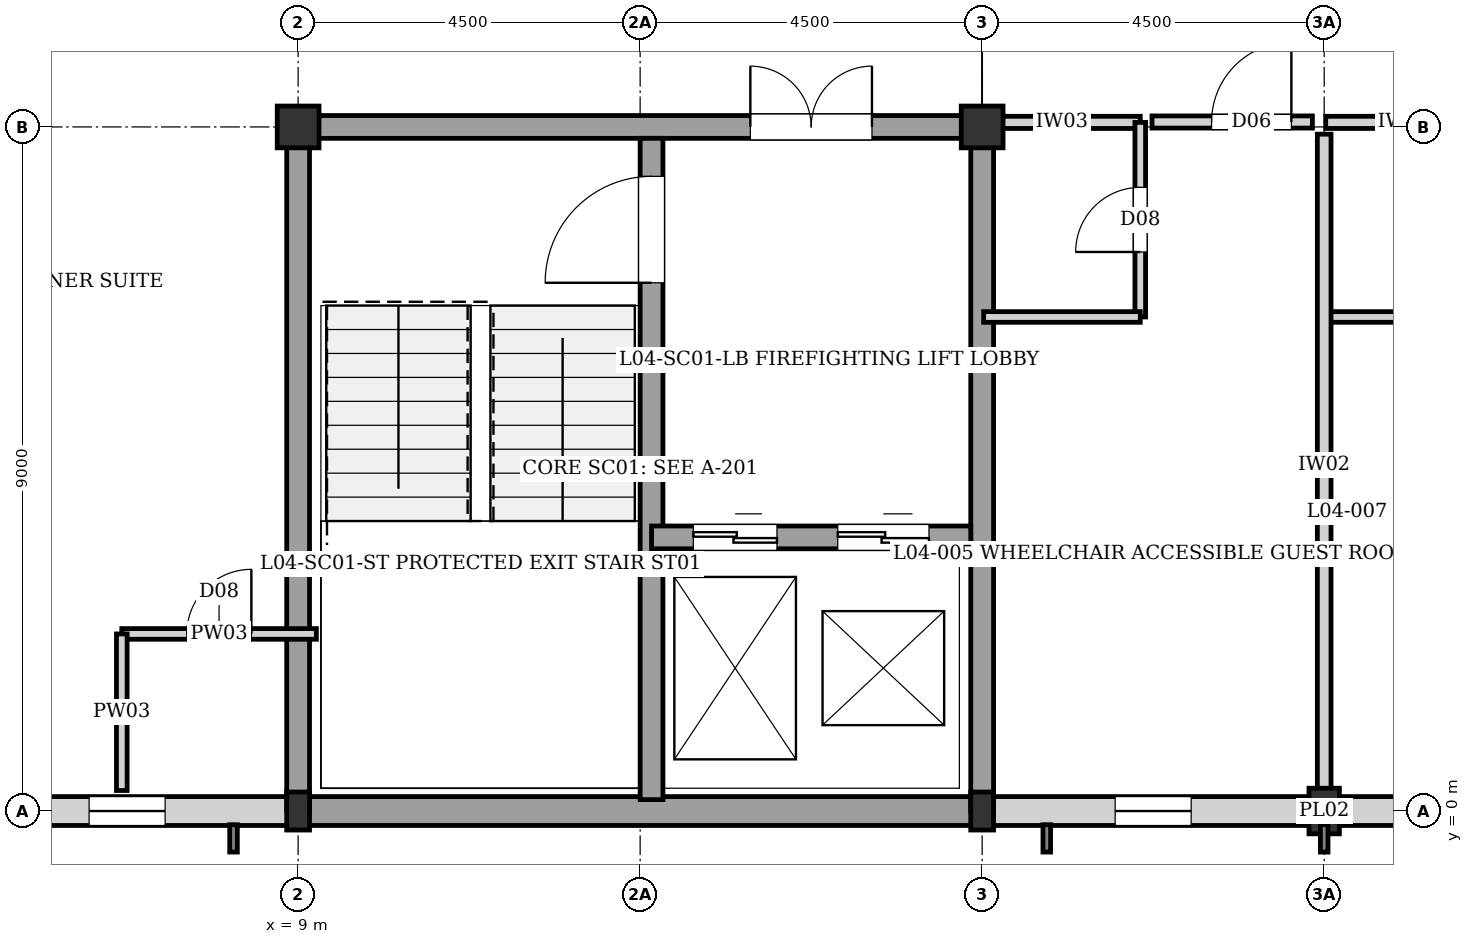
"""IFC4 building model, lengths in metres.
Left out: names, types, materials, properties, quantities, classifications, styles, units other than length and angle.
Written with IfcOpenShell. Run it as: python <this file> out.ifc"""

import sys

from ifc_helpers import new_model, si_unit, direction, frame, frame_2d, origin, origin_2d, place, context, subcontext, project, spatial, rectangle, i_section, extrude, element, fill, save


model = new_model("IFC4")
c1 = context("Model", 3, precision=1e-05, world=origin(), true_north=direction((0.0, 1.0)))
c2 = subcontext(c1, "Body", "Model", "MODEL_VIEW")
j1 = project(units=[si_unit("LENGTHUNIT", "METRE"), si_unit("PLANEANGLEUNIT", "RADIAN")], contexts=[c1])
p1 = place(None, origin())
s1 = spatial("IfcSite", under=j1, at=p1, CompositionType="ELEMENT")
p2 = place(p1, origin())
s2 = spatial("IfcBuilding", under=s1, at=p2, CompositionType="ELEMENT")
p3 = place(p2, frame((0.0, 0.0, 14.56)))
s3 = spatial("IfcBuildingStorey", under=s2, at=p3, CompositionType="ELEMENT", Elevation=14.56)
p4 = place(p3, frame((9.0, 0.0, 0.0), z_axis=(0.0, 0.0, 1.0), x_axis=(1.0, 0.0, 0.0)))
e1 = element("IfcColumn", 1, at=p4, inside=s3, PredefinedType="COLUMN", context=c2, shape_type="SweptSolid", body=[
    extrude(i_section(OverallWidth=0.3, OverallDepth=0.5, WebThickness=0.014, FlangeThickness=0.028, at=origin_2d()), origin(), (0.0, 0.0, 1.0), 3.04),
])
p5 = place(p3, frame((9.0, 9.0, 0.0), z_axis=(0.0, 0.0, 1.0), x_axis=(1.0, 0.0, 0.0)))
e2 = element("IfcColumn", 2, at=p5, inside=s3, PredefinedType="COLUMN", context=c2, shape_type="SweptSolid", body=[
    extrude(rectangle(XDim=0.55, YDim=0.55, at=origin_2d()), origin(), (0.0, 0.0, 1.0), 3.04),
])
p6 = place(p3, frame((18.0, 0.0, 0.0), z_axis=(0.0, 0.0, 1.0), x_axis=(1.0, 0.0, 0.0)))
e3 = element("IfcColumn", 3, at=p6, inside=s3, PredefinedType="COLUMN", context=c2, shape_type="SweptSolid", body=[
    extrude(i_section(OverallWidth=0.3, OverallDepth=0.5, WebThickness=0.014, FlangeThickness=0.028, at=origin_2d()), origin(), (0.0, 0.0, 1.0), 3.04),
])
p7 = place(p3, frame((18.0, 9.0, 0.0), z_axis=(0.0, 0.0, 1.0), x_axis=(1.0, 0.0, 0.0)))
e4 = element("IfcColumn", 4, at=p7, inside=s3, PredefinedType="COLUMN", context=c2, shape_type="SweptSolid", body=[
    extrude(rectangle(XDim=0.55, YDim=0.55, at=origin_2d()), origin(), (0.0, 0.0, 1.0), 3.04),
])
p8 = place(p3, frame((22.5, 0.0, 0.0), z_axis=(0.0, 0.0, 1.0), x_axis=(1.0, 0.0, 0.0)))
e5 = element("IfcColumn", 5, at=p8, inside=s3, PredefinedType="PILASTER", context=c2, shape_type="SweptSolid", body=[
    extrude(rectangle(XDim=0.4, YDim=0.6, at=origin_2d()), origin(), (0.0, 0.0, 1.0), 3.04),
])
p9 = place(p3, frame((27.0, 0.0, 0.0), z_axis=(0.0, 0.0, 1.0), x_axis=(-1.0, 0.0, 0.0)))
e6 = element("IfcWall", 6, at=p9, inside=s3, PredefinedType="SOLIDWALL", context=c2, shape_type="SweptSolid", body=[
    extrude(rectangle(XDim=8.87, YDim=0.38, at=frame_2d((4.435, 0.0))), origin(), (0.0, 0.0, 1.0), 2.55),
])
p10 = place(p9, frame((1.75, 0.0, 0.35)))
e7 = element("IfcOpeningElement", 7, at=p10, cuts=e6, PredefinedType="OPENING", context=c2, shape_type="SweptSolid", body=[
    extrude(rectangle(XDim=1.0, YDim=1.6, at=frame_2d((0.5, 0.8))), frame((0.0, 0.2, 0.0), z_axis=(0.0, -1.0, 0.0), x_axis=(1.0, 0.0, 0.0)), (0.0, 0.0, 1.0), 0.4),
])
p11 = place(p9, frame((6.25, 0.0, 0.35)))
e8 = element("IfcOpeningElement", 8, at=p11, cuts=e6, PredefinedType="OPENING", context=c2, shape_type="SweptSolid", body=[
    extrude(rectangle(XDim=1.0, YDim=1.6, at=frame_2d((0.5, 0.8))), frame((0.0, 0.2, 0.0), z_axis=(0.0, -1.0, 0.0), x_axis=(1.0, 0.0, 0.0)), (0.0, 0.0, 1.0), 0.4),
])
p12 = place(p3, frame((18.0, 0.0, 0.0), z_axis=(0.0, 0.0, 1.0), x_axis=(-1.0, 0.0, 0.0)))
e9 = element("IfcWall", 9, at=p12, inside=s3, PredefinedType="SOLIDWALL", context=c2, shape_type="SweptSolid", body=[
    extrude(rectangle(XDim=9.0, YDim=0.38, at=frame_2d((4.5, 0.0))), origin(), (0.0, 0.0, 1.0), 2.82),
])
p13 = place(p3, frame((8.87, 0.0, 0.0), z_axis=(0.0, 0.0, 1.0), x_axis=(-1.0, 0.0, 0.0)))
e10 = element("IfcWall", 10, at=p13, inside=s3, PredefinedType="SOLIDWALL", context=c2, shape_type="SweptSolid", body=[
    extrude(rectangle(XDim=8.87, YDim=0.38, at=frame_2d((4.435, 0.0))), origin(), (0.0, 0.0, 1.0), 2.42),
])
p14 = place(p13, frame((1.62, 0.0, 0.35)))
e11 = element("IfcOpeningElement", 11, at=p14, cuts=e10, PredefinedType="OPENING", context=c2, shape_type="SweptSolid", body=[
    extrude(rectangle(XDim=1.0, YDim=1.6, at=frame_2d((0.5, 0.8))), frame((0.0, 0.2, 0.0), z_axis=(0.0, -1.0, 0.0), x_axis=(1.0, 0.0, 0.0)), (0.0, 0.0, 1.0), 0.4),
])
p15 = place(p13, frame((6.12, 0.0, 0.35)))
e12 = element("IfcOpeningElement", 12, at=p15, cuts=e10, PredefinedType="OPENING", context=c2, shape_type="SweptSolid", body=[
    extrude(rectangle(XDim=1.0, YDim=1.6, at=frame_2d((0.5, 0.8))), frame((0.0, 0.2, 0.0), z_axis=(0.0, -1.0, 0.0), x_axis=(1.0, 0.0, 0.0)), (0.0, 0.0, 1.0), 0.4),
])
p16 = place(p3, frame((18.0, 0.0, 0.0), z_axis=(0.0, 0.0, 1.0), x_axis=(0.0, 1.0, 0.0)))
e13 = element("IfcWall", 13, at=p16, inside=s3, PredefinedType="SHEAR", context=c2, shape_type="SweptSolid", body=[
    extrude(rectangle(XDim=9.0, YDim=0.3, at=frame_2d((4.5, 0.0))), origin(), (0.0, 0.0, 1.0), 2.82),
])
p17 = place(p3, frame((9.0, 9.0, 0.0), z_axis=(0.0, 0.0, 1.0), x_axis=(1.0, 0.0, 0.0)))
e14 = element("IfcWall", 14, at=p17, inside=s3, PredefinedType="SHEAR", context=c2, shape_type="SweptSolid", body=[
    extrude(rectangle(XDim=9.0, YDim=0.3, at=frame_2d((4.5, 0.0))), origin(), (0.0, 0.0, 1.0), 2.82),
])
p18 = place(p17, frame((5.95, 0.0, 0.0)))
e15 = element("IfcOpeningElement", 15, at=p18, cuts=e14, PredefinedType="OPENING", context=c2, shape_type="SweptSolid", body=[
    extrude(rectangle(XDim=1.6, YDim=2.1, at=frame_2d((0.8, 1.05))), frame((0.0, 0.16, 0.0), z_axis=(0.0, -1.0, 0.0), x_axis=(1.0, 0.0, 0.0)), (0.0, 0.0, 1.0), 0.32),
])
p19 = place(p3, frame((9.0, 0.0, 0.0), z_axis=(0.0, 0.0, 1.0), x_axis=(0.0, 1.0, 0.0)))
e16 = element("IfcWall", 16, at=p19, inside=s3, PredefinedType="SHEAR", context=c2, shape_type="SweptSolid", body=[
    extrude(rectangle(XDim=9.0, YDim=0.3, at=frame_2d((4.5, 0.0))), origin(), (0.0, 0.0, 1.0), 2.82),
])
p20 = place(p3, frame((13.65, 0.15, 0.0), z_axis=(0.0, 0.0, 1.0), x_axis=(0.0, 1.0, 0.0)))
e17 = element("IfcWall", 17, at=p20, inside=s3, PredefinedType="SHEAR", context=c2, shape_type="SweptSolid", body=[
    extrude(rectangle(XDim=8.7, YDim=0.3, at=frame_2d((4.35, 0.0))), origin(), (0.0, 0.0, 1.0), 2.82),
])
p21 = place(p20, frame((6.8, 0.0, 0.0)))
e18 = element("IfcOpeningElement", 18, at=p21, cuts=e17, PredefinedType="OPENING", context=c2, shape_type="SweptSolid", body=[
    extrude(rectangle(XDim=1.4, YDim=2.02, at=frame_2d((0.7, 1.01))), frame((0.0, 0.16, 0.0), z_axis=(0.0, -1.0, 0.0), x_axis=(1.0, 0.0, 0.0)), (0.0, 0.0, 1.0), 0.32),
])
p22 = place(p3, frame((13.65, 3.6, 0.0), z_axis=(0.0, 0.0, 1.0), x_axis=(1.0, 0.0, 0.0)))
e19 = element("IfcWall", 19, at=p22, inside=s3, PredefinedType="SHEAR", context=c2, shape_type="SweptSolid", body=[
    extrude(rectangle(XDim=4.2, YDim=0.3, at=frame_2d((2.1, 0.0))), origin(), (0.0, 0.0, 1.0), 2.82),
])
p23 = place(p22, frame((0.55, 0.0, 0.0)))
e20 = element("IfcOpeningElement", 20, at=p23, cuts=e19, PredefinedType="OPENING", context=c2, shape_type="SweptSolid", body=[
    extrude(rectangle(XDim=1.1, YDim=2.1, at=frame_2d((0.55, 1.05))), frame((0.0, 0.16, 0.0), z_axis=(0.0, -1.0, 0.0), x_axis=(1.0, 0.0, 0.0)), (0.0, 0.0, 1.0), 0.32),
])
p24 = place(p22, frame((2.45, 0.0, 0.0)))
e21 = element("IfcOpeningElement", 21, at=p24, cuts=e19, PredefinedType="OPENING", context=c2, shape_type="SweptSolid", body=[
    extrude(rectangle(XDim=1.2, YDim=2.2, at=frame_2d((0.6, 1.1))), frame((0.0, 0.16, 0.0), z_axis=(0.0, -1.0, 0.0), x_axis=(1.0, 0.0, 0.0)), (0.0, 0.0, 1.0), 0.32),
])
p25 = place(p3, frame((6.68, 2.33, 0.0), z_axis=(0.0, 0.0, 1.0), x_axis=(1.0, 0.0, 0.0)))
e22 = element("IfcWall", 22, at=p25, inside=s3, PredefinedType="PLUMBINGWALL", context=c2, shape_type="SweptSolid", body=[
    extrude(rectangle(XDim=2.56, YDim=0.14, at=frame_2d((1.28, 0.0))), origin(), (0.0, 0.0, 1.0), 2.82),
])
p26 = place(p25, frame((0.855, 0.0, 0.0)))
e23 = element("IfcOpeningElement", 23, at=p26, cuts=e22, PredefinedType="OPENING", context=c2, shape_type="SweptSolid", body=[
    extrude(rectangle(XDim=0.85, YDim=2.04, at=frame_2d((0.425, 1.02))), frame((0.0, 0.08, 0.0), z_axis=(0.0, -1.0, 0.0), x_axis=(1.0, 0.0, 0.0)), (0.0, 0.0, 1.0), 0.16),
])
p27 = place(p3, frame((6.68, 0.27, 0.0), z_axis=(0.0, 0.0, 1.0), x_axis=(0.0, 1.0, 0.0)))
e24 = element("IfcWall", 24, at=p27, inside=s3, PredefinedType="PLUMBINGWALL", context=c2, shape_type="SweptSolid", body=[
    extrude(rectangle(XDim=2.06, YDim=0.14, at=frame_2d((1.03, 0.0))), origin(), (0.0, 0.0, 1.0), 2.82),
])
p28 = place(p3, frame((18.02, 9.06, 0.0), z_axis=(0.0, 0.0, 1.0), x_axis=(1.0, 0.0, 0.0)))
e25 = element("IfcWall", 25, at=p28, inside=s3, PredefinedType="PARTITIONING", context=c2, shape_type="SweptSolid", body=[
    extrude(rectangle(XDim=2.06, YDim=0.16, at=frame_2d((1.03, 0.0))), origin(), (0.0, 0.0, 1.0), 2.39),
])
p29 = place(p3, frame((20.08, 6.5, 0.0), z_axis=(0.0, 0.0, 1.0), x_axis=(0.0, 1.0, 0.0)))
e26 = element("IfcWall", 26, at=p29, inside=s3, PredefinedType="PLUMBINGWALL", context=c2, shape_type="SweptSolid", body=[
    extrude(rectangle(XDim=2.56, YDim=0.14, at=frame_2d((1.28, 0.0))), origin(), (0.0, 0.0, 1.0), 2.82),
])
p30 = place(p29, frame((0.855, 0.0, 0.0)))
e27 = element("IfcOpeningElement", 27, at=p30, cuts=e26, PredefinedType="OPENING", context=c2, shape_type="SweptSolid", body=[
    extrude(rectangle(XDim=0.85, YDim=2.04, at=frame_2d((0.425, 1.02))), frame((0.0, 0.08, 0.0), z_axis=(0.0, -1.0, 0.0), x_axis=(1.0, 0.0, 0.0)), (0.0, 0.0, 1.0), 0.16),
])
p31 = place(p3, frame((18.02, 6.5, 0.0), z_axis=(0.0, 0.0, 1.0), x_axis=(1.0, 0.0, 0.0)))
e28 = element("IfcWall", 28, at=p31, inside=s3, PredefinedType="PLUMBINGWALL", context=c2, shape_type="SweptSolid", body=[
    extrude(rectangle(XDim=2.06, YDim=0.14, at=frame_2d((1.03, 0.0))), origin(), (0.0, 0.0, 1.0), 2.82),
])
p32 = place(p3, frame((22.52, 9.06, 0.0), z_axis=(0.0, 0.0, 1.0), x_axis=(1.0, 0.0, 0.0)))
e29 = element("IfcWall", 29, at=p32, inside=s3, PredefinedType="PARTITIONING", context=c2, shape_type="SweptSolid", body=[
    extrude(rectangle(XDim=2.06, YDim=0.16, at=frame_2d((1.03, 0.0))), origin(), (0.0, 0.0, 1.0), 2.39),
])
p33 = place(p3, frame((22.52, 6.5, 0.0), z_axis=(0.0, 0.0, 1.0), x_axis=(1.0, 0.0, 0.0)))
e30 = element("IfcWall", 30, at=p33, inside=s3, PredefinedType="PLUMBINGWALL", context=c2, shape_type="SweptSolid", body=[
    extrude(rectangle(XDim=2.06, YDim=0.14, at=frame_2d((1.03, 0.0))), origin(), (0.0, 0.0, 1.0), 2.82),
])
p34 = place(p3, frame((22.5, 0.195, 0.0), z_axis=(0.0, 0.0, 1.0), x_axis=(0.0, 1.0, 0.0)))
e31 = element("IfcWall", 31, at=p34, inside=s3, PredefinedType="PARTITIONING", context=c2, shape_type="SweptSolid", body=[
    extrude(rectangle(XDim=8.71, YDim=0.18, at=frame_2d((4.355, 0.0))), origin(), (0.0, 0.0, 1.0), 2.82),
])
p35 = place(p3, frame((20.235, 9.065, 0.0), z_axis=(0.0, 0.0, 1.0), x_axis=(1.0, 0.0, 0.0)))
e32 = element("IfcWall", 32, at=p35, inside=s3, PredefinedType="PARTITIONING", context=c2, shape_type="SweptSolid", body=[
    extrude(rectangle(XDim=2.11, YDim=0.16, at=frame_2d((1.055, 0.0))), origin(), (0.0, 0.0, 1.0), 2.39),
])
p36 = place(p35, frame((0.783, 0.0, 0.0)))
e33 = element("IfcOpeningElement", 33, at=p36, cuts=e32, PredefinedType="OPENING", context=c2, shape_type="SweptSolid", body=[
    extrude(rectangle(XDim=1.05, YDim=2.15, at=frame_2d((0.525, 1.075))), frame((0.0, 0.09, 0.0), z_axis=(0.0, -1.0, 0.0), x_axis=(1.0, 0.0, 0.0)), (0.0, 0.0, 1.0), 0.18),
])
p37 = place(p11, origin())
e34 = element("IfcWindow", 34, at=p37, inside=s3, PartitioningType="SINGLE_PANEL", PredefinedType="WINDOW", context=c2, shape_type="SweptSolid", body=[
    extrude(rectangle(XDim=1.0, YDim=1.6, at=frame_2d((0.5, 0.8))), frame((0.0, 0.03, 0.0), z_axis=(0.0, -1.0, 0.0), x_axis=(1.0, 0.0, 0.0)), (0.0, 0.0, 1.0), 0.06),
])
fill(e8, e34)
p38 = place(p14, origin())
e35 = element("IfcWindow", 35, at=p38, inside=s3, PartitioningType="SINGLE_PANEL", PredefinedType="WINDOW", context=c2, shape_type="SweptSolid", body=[
    extrude(rectangle(XDim=1.0, YDim=1.6, at=frame_2d((0.5, 0.8))), frame((0.0, 0.03, 0.0), z_axis=(0.0, -1.0, 0.0), x_axis=(1.0, 0.0, 0.0)), (0.0, 0.0, 1.0), 0.06),
])
fill(e11, e35)
p39 = place(p18, origin())
e36 = element("IfcDoor", 36, at=p39, inside=s3, OperationType="DOUBLE_DOOR_SINGLE_SWING", PredefinedType="DOOR", context=c2, shape_type="SweptSolid", body=[
    extrude(rectangle(XDim=1.6, YDim=2.1, at=frame_2d((0.8, 1.05))), frame((0.0, 0.025, 0.0), z_axis=(0.0, -1.0, 0.0), x_axis=(1.0, 0.0, 0.0)), (0.0, 0.0, 1.0), 0.05),
])
fill(e15, e36)
p40 = place(p21, origin())
e37 = element("IfcDoor", 37, at=p40, inside=s3, OperationType="SINGLE_SWING_LEFT", PredefinedType="DOOR", context=c2, shape_type="SweptSolid", body=[
    extrude(rectangle(XDim=1.4, YDim=2.02, at=frame_2d((0.7, 1.01))), frame((0.0, 0.025, 0.0), z_axis=(0.0, -1.0, 0.0), x_axis=(1.0, 0.0, 0.0)), (0.0, 0.0, 1.0), 0.05),
])
fill(e18, e37)
p41 = place(p23, origin())
e38 = element("IfcDoor", 38, at=p41, inside=s3, OperationType="DOUBLE_DOOR_SLIDING", PredefinedType="DOOR", context=c2, shape_type="SweptSolid", body=[
    extrude(rectangle(XDim=1.1, YDim=2.1, at=frame_2d((0.55, 1.05))), frame((0.0, 0.025, 0.0), z_axis=(0.0, -1.0, 0.0), x_axis=(1.0, 0.0, 0.0)), (0.0, 0.0, 1.0), 0.05),
])
fill(e20, e38)
p42 = place(p24, origin())
e39 = element("IfcDoor", 39, at=p42, inside=s3, OperationType="DOUBLE_DOOR_SLIDING", PredefinedType="DOOR", context=c2, shape_type="SweptSolid", body=[
    extrude(rectangle(XDim=1.2, YDim=2.2, at=frame_2d((0.6, 1.1))), frame((0.0, 0.025, 0.0), z_axis=(0.0, -1.0, 0.0), x_axis=(1.0, 0.0, 0.0)), (0.0, 0.0, 1.0), 0.05),
])
fill(e21, e39)
p43 = place(p26, origin())
e40 = element("IfcDoor", 40, at=p43, inside=s3, OperationType="SINGLE_SWING_RIGHT", PredefinedType="DOOR", context=c2, shape_type="SweptSolid", body=[
    extrude(rectangle(XDim=0.85, YDim=2.04, at=frame_2d((0.425, 1.02))), frame((0.0, 0.025, 0.0), z_axis=(0.0, -1.0, 0.0), x_axis=(1.0, 0.0, 0.0)), (0.0, 0.0, 1.0), 0.05),
])
fill(e23, e40)
p44 = place(p30, origin())
e41 = element("IfcDoor", 41, at=p44, inside=s3, OperationType="SINGLE_SWING_LEFT", PredefinedType="DOOR", context=c2, shape_type="SweptSolid", body=[
    extrude(rectangle(XDim=0.85, YDim=2.04, at=frame_2d((0.425, 1.02))), frame((0.0, 0.025, 0.0), z_axis=(0.0, -1.0, 0.0), x_axis=(1.0, 0.0, 0.0)), (0.0, 0.0, 1.0), 0.05),
])
fill(e27, e41)
p45 = place(p36, origin())
e42 = element("IfcDoor", 42, at=p45, inside=s3, OperationType="SINGLE_SWING_RIGHT", PredefinedType="DOOR", context=c2, shape_type="SweptSolid", body=[
    extrude(rectangle(XDim=1.05, YDim=2.15, at=frame_2d((0.525, 1.075))), frame((0.0, 0.025, 0.0), z_axis=(0.0, -1.0, 0.0), x_axis=(1.0, 0.0, 0.0)), (0.0, 0.0, 1.0), 0.05),
])
fill(e33, e42)
save(model, sys.argv[1])
